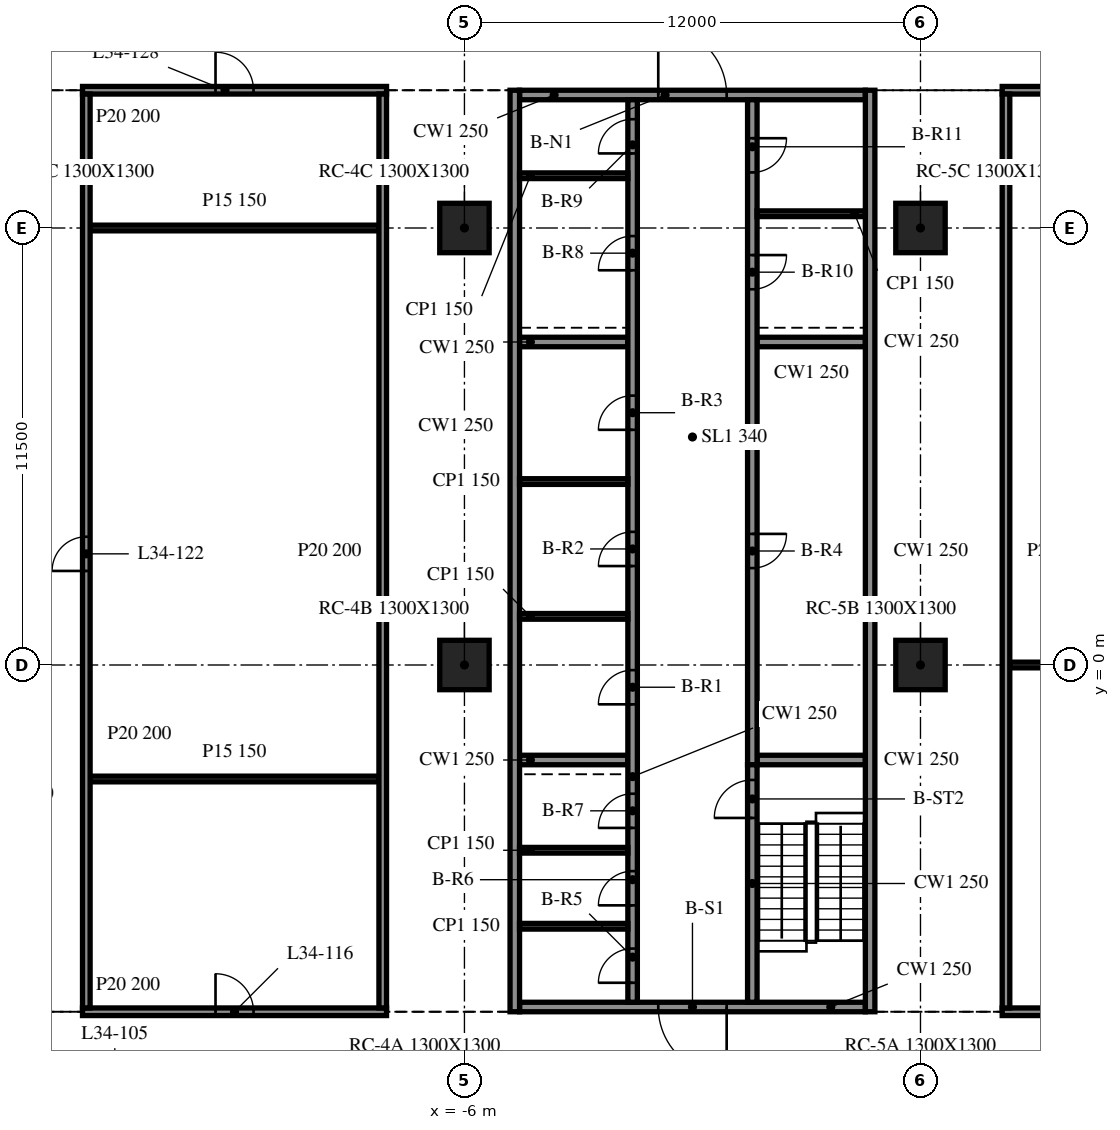
"""IFC4 building model, lengths in metres.
Left out: names, types, materials, properties, quantities, classifications, styles, units other than length and angle.
Written with IfcOpenShell. Run it as: python <this file> out.ifc"""

import sys

from ifc_helpers import new_model, si_unit, direction, frame, frame_2d, origin, origin_2d, place, context, subcontext, project, spatial, rectangle, extrude, element, fill, save


model = new_model("IFC4")
c1 = context("Model", 3, precision=1e-05, world=origin(), true_north=direction((0.0, 1.0)))
c2 = subcontext(c1, "Body", "Model", "MODEL_VIEW")
j1 = project(units=[si_unit("LENGTHUNIT", "METRE"), si_unit("PLANEANGLEUNIT", "RADIAN")], contexts=[c1])
p1 = place(None, origin())
s1 = spatial("IfcSite", under=j1, at=p1, CompositionType="ELEMENT")
p2 = place(p1, origin())
s2 = spatial("IfcBuilding", under=s1, at=p2, CompositionType="ELEMENT")
p3 = place(p2, frame((0.0, 0.0, 146.6)))
s3 = spatial("IfcBuildingStorey", under=s2, at=p3, CompositionType="ELEMENT", Elevation=146.6)
for number, where, z_axis, x_axis in (
    (1, (-6.0, 0.0, -0.34), (0.0, 0.0, 1.0), (1.0, 0.0, 0.0)),
    (2, (-6.0, 11.5, -0.34), (0.0, 0.0, 1.0), (1.0, 0.0, 0.0)),
    (3, (6.0, 0.0, -0.34), (0.0, 0.0, 1.0), (1.0, 0.0, 0.0)),
    (4, (6.0, 11.5, -0.34), (0.0, 0.0, 1.0), (1.0, 0.0, 0.0)),
):
    element("IfcColumn", number, at=place(p3, frame(where, z_axis=z_axis, x_axis=x_axis)), inside=s3, PredefinedType="COLUMN", context=c2, shape_type="SweptSolid", body=[
        extrude(rectangle(XDim=1.3, YDim=1.3, at=origin_2d()), origin(), (0.0, 0.0, 1.0), 4.1),
    ])
for number, where, z_axis, x_axis in (
    (5, (-4.675, 15.125, 0.0), (0.0, 0.0, 1.0), (0.0, -1.0, 0.0)),
    (6, (4.675, -9.125, 0.0), (0.0, 0.0, 1.0), (0.0, 1.0, 0.0)),
):
    element("IfcWall", number, at=place(p3, frame(where, z_axis=z_axis, x_axis=x_axis)), inside=s3, PredefinedType="SOLIDWALL", context=c2, shape_type="SweptSolid", body=[
        extrude(rectangle(XDim=24.25, YDim=0.25, at=frame_2d((12.125, 0.0))), origin(), (0.0, 0.0, 1.0), 3.76),
    ])
p4 = place(p3, frame((4.55, -9.0, 0.0), z_axis=(0.0, 0.0, 1.0), x_axis=(-1.0, 0.0, 0.0)))
e7 = element("IfcWall", 7, at=p4, inside=s3, PredefinedType="SOLIDWALL", context=c2, shape_type="SweptSolid", body=[
    extrude(rectangle(XDim=9.1, YDim=0.25, at=frame_2d((4.55, 0.0))), origin(), (0.0, 0.0, 1.0), 3.76),
])
p5 = place(p4, frame((3.65, 0.0, 0.0)))
e8 = element("IfcOpeningElement", 8, at=p5, cuts=e7, PredefinedType="OPENING", context=c2, shape_type="SweptSolid", body=[
    extrude(rectangle(XDim=1.8, YDim=2.1, at=frame_2d((0.9, 1.05))), frame((0.0, 0.135, 0.0), z_axis=(0.0, -1.0, 0.0), x_axis=(1.0, 0.0, 0.0)), (0.0, 0.0, 1.0), 0.27),
])
p6 = place(p3, frame((-4.55, 15.0, 0.0), z_axis=(0.0, 0.0, 1.0), x_axis=(1.0, 0.0, 0.0)))
e9 = element("IfcWall", 9, at=p6, inside=s3, PredefinedType="SOLIDWALL", context=c2, shape_type="SweptSolid", body=[
    extrude(rectangle(XDim=9.1, YDim=0.25, at=frame_2d((4.55, 0.0))), origin(), (0.0, 0.0, 1.0), 3.76),
])
p7 = place(p6, frame((3.65, 0.0, 0.0)))
e10 = element("IfcOpeningElement", 10, at=p7, cuts=e9, PredefinedType="OPENING", context=c2, shape_type="SweptSolid", body=[
    extrude(rectangle(XDim=1.8, YDim=2.1, at=frame_2d((0.9, 1.05))), frame((0.0, 0.135, 0.0), z_axis=(0.0, -1.0, 0.0), x_axis=(1.0, 0.0, 0.0)), (0.0, 0.0, 1.0), 0.27),
])
p8 = place(p3, frame((-1.575, -8.875, 0.0), z_axis=(0.0, 0.0, 1.0), x_axis=(0.0, 1.0, 0.0)))
e11 = element("IfcWall", 11, at=p8, inside=s3, PredefinedType="SOLIDWALL", context=c2, shape_type="SweptSolid", body=[
    extrude(rectangle(XDim=23.75, YDim=0.25, at=frame_2d((11.875, 0.0))), origin(), (0.0, 0.0, 1.0), 3.76),
])
p9 = place(p8, frame((7.84, 0.0, 0.0)))
e12 = element("IfcOpeningElement", 12, at=p9, cuts=e11, PredefinedType="OPENING", context=c2, shape_type="SweptSolid", body=[
    extrude(rectangle(XDim=0.9, YDim=2.1, at=frame_2d((0.45, 1.05))), frame((0.0, 0.135, 0.0), z_axis=(0.0, -1.0, 0.0), x_axis=(1.0, 0.0, 0.0)), (0.0, 0.0, 1.0), 0.27),
])
p10 = place(p8, frame((11.479, 0.0, 0.0)))
e13 = element("IfcOpeningElement", 13, at=p10, cuts=e11, PredefinedType="OPENING", context=c2, shape_type="SweptSolid", body=[
    extrude(rectangle(XDim=0.9, YDim=2.1, at=frame_2d((0.45, 1.05))), frame((0.0, 0.135, 0.0), z_axis=(0.0, -1.0, 0.0), x_axis=(1.0, 0.0, 0.0)), (0.0, 0.0, 1.0), 0.27),
])
p11 = place(p8, frame((15.064, 0.0, 0.0)))
e14 = element("IfcOpeningElement", 14, at=p11, cuts=e11, PredefinedType="OPENING", context=c2, shape_type="SweptSolid", body=[
    extrude(rectangle(XDim=0.9, YDim=2.1, at=frame_2d((0.45, 1.05))), frame((0.0, 0.135, 0.0), z_axis=(0.0, -1.0, 0.0), x_axis=(1.0, 0.0, 0.0)), (0.0, 0.0, 1.0), 0.27),
])
p12 = place(p8, frame((0.512, 0.0, 0.0)))
e15 = element("IfcOpeningElement", 15, at=p12, cuts=e11, PredefinedType="OPENING", context=c2, shape_type="SweptSolid", body=[
    extrude(rectangle(XDim=0.9, YDim=2.1, at=frame_2d((0.45, 1.05))), frame((0.0, 0.135, 0.0), z_axis=(0.0, -1.0, 0.0), x_axis=(1.0, 0.0, 0.0)), (0.0, 0.0, 1.0), 0.27),
])
p13 = place(p8, frame((2.55, 0.0, 0.0)))
e16 = element("IfcOpeningElement", 16, at=p13, cuts=e11, PredefinedType="OPENING", context=c2, shape_type="SweptSolid", body=[
    extrude(rectangle(XDim=0.9, YDim=2.1, at=frame_2d((0.45, 1.05))), frame((0.0, 0.135, 0.0), z_axis=(0.0, -1.0, 0.0), x_axis=(1.0, 0.0, 0.0)), (0.0, 0.0, 1.0), 0.27),
])
p14 = place(p8, frame((4.587, 0.0, 0.0)))
e17 = element("IfcOpeningElement", 17, at=p14, cuts=e11, PredefinedType="OPENING", context=c2, shape_type="SweptSolid", body=[
    extrude(rectangle(XDim=0.9, YDim=2.1, at=frame_2d((0.45, 1.05))), frame((0.0, 0.135, 0.0), z_axis=(0.0, -1.0, 0.0), x_axis=(1.0, 0.0, 0.0)), (0.0, 0.0, 1.0), 0.27),
])
p15 = place(p8, frame((19.262, 0.0, 0.0)))
e18 = element("IfcOpeningElement", 18, at=p15, cuts=e11, PredefinedType="OPENING", context=c2, shape_type="SweptSolid", body=[
    extrude(rectangle(XDim=0.9, YDim=2.1, at=frame_2d((0.45, 1.05))), frame((0.0, 0.135, 0.0), z_axis=(0.0, -1.0, 0.0), x_axis=(1.0, 0.0, 0.0)), (0.0, 0.0, 1.0), 0.27),
])
p16 = place(p8, frame((22.337, 0.0, 0.0)))
e19 = element("IfcOpeningElement", 19, at=p16, cuts=e11, PredefinedType="OPENING", context=c2, shape_type="SweptSolid", body=[
    extrude(rectangle(XDim=0.9, YDim=2.1, at=frame_2d((0.45, 1.05))), frame((0.0, 0.135, 0.0), z_axis=(0.0, -1.0, 0.0), x_axis=(1.0, 0.0, 0.0)), (0.0, 0.0, 1.0), 0.27),
])
p17 = place(p3, frame((1.575, -8.875, 0.0), z_axis=(0.0, 0.0, 1.0), x_axis=(0.0, 1.0, 0.0)))
e20 = element("IfcWall", 20, at=p17, inside=s3, PredefinedType="SOLIDWALL", context=c2, shape_type="SweptSolid", body=[
    extrude(rectangle(XDim=6.25, YDim=0.25, at=frame_2d((3.125, 0.0))), origin(), (0.0, 0.0, 1.0), 3.76),
])
p18 = place(p17, frame((4.85, 0.0, 0.0)))
e21 = element("IfcOpeningElement", 21, at=p18, cuts=e20, PredefinedType="OPENING", context=c2, shape_type="SweptSolid", body=[
    extrude(rectangle(XDim=1.0, YDim=2.1, at=frame_2d((0.5, 1.05))), frame((0.0, 0.135, 0.0), z_axis=(0.0, -1.0, 0.0), x_axis=(1.0, 0.0, 0.0)), (0.0, 0.0, 1.0), 0.27),
])
p19 = place(p3, frame((1.575, 14.875, 0.0), z_axis=(0.0, 0.0, 1.0), x_axis=(0.0, -1.0, 0.0)))
e22 = element("IfcWall", 22, at=p19, inside=s3, PredefinedType="SOLIDWALL", context=c2, shape_type="SweptSolid", body=[
    extrude(rectangle(XDim=17.5, YDim=0.25, at=frame_2d((8.75, 0.0))), origin(), (0.0, 0.0, 1.0), 3.76),
])
p20 = place(p19, frame((11.425, 0.0, 0.0)))
e23 = element("IfcOpeningElement", 23, at=p20, cuts=e22, PredefinedType="OPENING", context=c2, shape_type="SweptSolid", body=[
    extrude(rectangle(XDim=0.9, YDim=2.1, at=frame_2d((0.45, 1.05))), frame((0.0, 0.135, 0.0), z_axis=(0.0, -1.0, 0.0), x_axis=(1.0, 0.0, 0.0)), (0.0, 0.0, 1.0), 0.27),
])
p21 = place(p19, frame((4.087, 0.0, 0.0)))
e24 = element("IfcOpeningElement", 24, at=p21, cuts=e22, PredefinedType="OPENING", context=c2, shape_type="SweptSolid", body=[
    extrude(rectangle(XDim=0.9, YDim=2.1, at=frame_2d((0.45, 1.05))), frame((0.0, 0.135, 0.0), z_axis=(0.0, -1.0, 0.0), x_axis=(1.0, 0.0, 0.0)), (0.0, 0.0, 1.0), 0.27),
])
p22 = place(p19, frame((1.012, 0.0, 0.0)))
e25 = element("IfcOpeningElement", 25, at=p22, cuts=e22, PredefinedType="OPENING", context=c2, shape_type="SweptSolid", body=[
    extrude(rectangle(XDim=0.9, YDim=2.1, at=frame_2d((0.45, 1.05))), frame((0.0, 0.135, 0.0), z_axis=(0.0, -1.0, 0.0), x_axis=(1.0, 0.0, 0.0)), (0.0, 0.0, 1.0), 0.27),
])
for number, where, z_axis, x_axis in (
    (26, (-4.55, -2.5, 0.0), (0.0, 0.0, 1.0), (1.0, 0.0, 0.0)),
    (27, (-4.55, 8.5, 0.0), (0.0, 0.0, 1.0), (1.0, 0.0, 0.0)),
    (28, (1.7, -2.5, 0.0), (0.0, 0.0, 1.0), (1.0, 0.0, 0.0)),
    (29, (1.7, 8.5, 0.0), (0.0, 0.0, 1.0), (1.0, 0.0, 0.0)),
):
    element("IfcWall", number, at=place(p3, frame(where, z_axis=z_axis, x_axis=x_axis)), inside=s3, PredefinedType="SOLIDWALL", context=c2, shape_type="SweptSolid", body=[
        extrude(rectangle(XDim=2.85, YDim=0.25, at=frame_2d((1.425, 0.0))), origin(), (0.0, 0.0, 1.0), 3.76),
    ])
for number, where, z_axis, x_axis in (
    (30, (-4.55, 1.28, 0.0), (0.0, 0.0, 1.0), (1.0, 0.0, 0.0)),
    (31, (-4.55, 4.827, 0.0), (0.0, 0.0, 1.0), (1.0, 0.0, 0.0)),
    (32, (-4.55, -6.875, 0.0), (0.0, 0.0, 1.0), (1.0, 0.0, 0.0)),
    (33, (-4.55, -4.875, 0.0), (0.0, 0.0, 1.0), (1.0, 0.0, 0.0)),
    (34, (-4.55, 12.875, 0.0), (0.0, 0.0, 1.0), (1.0, 0.0, 0.0)),
    (35, (1.7, 11.875, 0.0), (0.0, 0.0, 1.0), (1.0, 0.0, 0.0)),
):
    element("IfcWall", number, at=place(p3, frame(where, z_axis=z_axis, x_axis=x_axis)), inside=s3, PredefinedType="PARTITIONING", context=c2, shape_type="SweptSolid", body=[
        extrude(rectangle(XDim=2.85, YDim=0.15, at=frame_2d((1.425, 0.0))), origin(), (0.0, 0.0, 1.0), 3.76),
    ])
p23 = place(p3, frame((-16.05, -9.125, 0.0), z_axis=(0.0, 0.0, 1.0), x_axis=(1.0, 0.0, 0.0)))
e36 = element("IfcWall", 36, at=p23, inside=s3, PredefinedType="PARTITIONING", context=c2, shape_type="SweptSolid", body=[
    extrude(rectangle(XDim=8.0, YDim=0.2, at=frame_2d((4.0, 0.0))), origin(), (0.0, 0.0, 1.0), 3.76),
])
p24 = place(p23, frame((3.5, 0.0, 0.0)))
e37 = element("IfcOpeningElement", 37, at=p24, cuts=e36, PredefinedType="OPENING", context=c2, shape_type="SweptSolid", body=[
    extrude(rectangle(XDim=1.0, YDim=2.1, at=frame_2d((0.5, 1.05))), frame((0.0, 0.11, 0.0), z_axis=(0.0, -1.0, 0.0), x_axis=(1.0, 0.0, 0.0)), (0.0, 0.0, 1.0), 0.22),
])
p25 = place(p3, frame((8.15, -9.125, 0.0), z_axis=(0.0, 0.0, 1.0), x_axis=(1.0, 0.0, 0.0)))
e38 = element("IfcWall", 38, at=p25, inside=s3, PredefinedType="PARTITIONING", context=c2, shape_type="SweptSolid", body=[
    extrude(rectangle(XDim=7.6, YDim=0.2, at=frame_2d((3.8, 0.0))), origin(), (0.0, 0.0, 1.0), 3.76),
])
p26 = place(p25, frame((3.3, 0.0, 0.0)))
e39 = element("IfcOpeningElement", 39, at=p26, cuts=e38, PredefinedType="OPENING", context=c2, shape_type="SweptSolid", body=[
    extrude(rectangle(XDim=1.0, YDim=2.1, at=frame_2d((0.5, 1.05))), frame((0.0, 0.11, 0.0), z_axis=(0.0, -1.0, 0.0), x_axis=(1.0, 0.0, 0.0)), (0.0, 0.0, 1.0), 0.22),
])
p27 = place(p3, frame((-15.85, -3.0, 0.0), z_axis=(0.0, 0.0, 1.0), x_axis=(1.0, 0.0, 0.0)))
e40 = element("IfcWall", 40, at=p27, inside=s3, PredefinedType="PARTITIONING", context=c2, shape_type="SweptSolid", body=[
    extrude(rectangle(XDim=7.6, YDim=0.15, at=frame_2d((3.8, 0.0))), origin(), (0.0, 0.0, 1.0), 3.76),
])
p28 = place(p3, frame((8.35, 0.0, 0.0), z_axis=(0.0, 0.0, 1.0), x_axis=(1.0, 0.0, 0.0)))
e41 = element("IfcWall", 41, at=p28, inside=s3, PredefinedType="PARTITIONING", context=c2, shape_type="SweptSolid", body=[
    extrude(rectangle(XDim=7.2, YDim=0.15, at=frame_2d((3.6, 0.0))), origin(), (0.0, 0.0, 1.0), 3.76),
])
p29 = place(p3, frame((-15.85, 11.5, 0.0), z_axis=(0.0, 0.0, 1.0), x_axis=(1.0, 0.0, 0.0)))
e42 = element("IfcWall", 42, at=p29, inside=s3, PredefinedType="PARTITIONING", context=c2, shape_type="SweptSolid", body=[
    extrude(rectangle(XDim=7.6, YDim=0.15, at=frame_2d((3.8, 0.0))), origin(), (0.0, 0.0, 1.0), 3.76),
])
p30 = place(p3, frame((-16.05, 15.125, 0.0), z_axis=(0.0, 0.0, 1.0), x_axis=(1.0, 0.0, 0.0)))
e43 = element("IfcWall", 43, at=p30, inside=s3, PredefinedType="PARTITIONING", context=c2, shape_type="SweptSolid", body=[
    extrude(rectangle(XDim=8.0, YDim=0.2, at=frame_2d((4.0, 0.0))), origin(), (0.0, 0.0, 1.0), 3.76),
])
p31 = place(p30, frame((3.5, 0.0, 0.0)))
e44 = element("IfcOpeningElement", 44, at=p31, cuts=e43, PredefinedType="OPENING", context=c2, shape_type="SweptSolid", body=[
    extrude(rectangle(XDim=1.0, YDim=2.1, at=frame_2d((0.5, 1.05))), frame((0.0, 0.11, 0.0), z_axis=(0.0, -1.0, 0.0), x_axis=(1.0, 0.0, 0.0)), (0.0, 0.0, 1.0), 0.22),
])
p32 = place(p3, frame((8.15, 15.125, 0.0), z_axis=(0.0, 0.0, 1.0), x_axis=(1.0, 0.0, 0.0)))
e45 = element("IfcWall", 45, at=p32, inside=s3, PredefinedType="PARTITIONING", context=c2, shape_type="SweptSolid", body=[
    extrude(rectangle(XDim=7.6, YDim=0.2, at=frame_2d((3.8, 0.0))), origin(), (0.0, 0.0, 1.0), 3.76),
])
p33 = place(p32, frame((3.3, 0.0, 0.0)))
e46 = element("IfcOpeningElement", 46, at=p33, cuts=e45, PredefinedType="OPENING", context=c2, shape_type="SweptSolid", body=[
    extrude(rectangle(XDim=0.9, YDim=2.1, at=frame_2d((0.45, 1.05))), frame((0.0, 0.11, 0.0), z_axis=(0.0, -1.0, 0.0), x_axis=(1.0, 0.0, 0.0)), (0.0, 0.0, 1.0), 0.22),
])
p34 = place(p3, frame((-15.95, -9.025, 0.0), z_axis=(0.0, 0.0, 1.0), x_axis=(0.0, 1.0, 0.0)))
e47 = element("IfcWall", 47, at=p34, inside=s3, PredefinedType="PARTITIONING", context=c2, shape_type="SweptSolid", body=[
    extrude(rectangle(XDim=24.05, YDim=0.2, at=frame_2d((12.025, 0.0))), origin(), (0.0, 0.0, 1.0), 3.76),
])
p35 = place(p34, frame((11.5, 0.0, 0.0)))
e48 = element("IfcOpeningElement", 48, at=p35, cuts=e47, PredefinedType="OPENING", context=c2, shape_type="SweptSolid", body=[
    extrude(rectangle(XDim=0.9, YDim=2.1, at=frame_2d((0.45, 1.05))), frame((0.0, 0.11, 0.0), z_axis=(0.0, -1.0, 0.0), x_axis=(1.0, 0.0, 0.0)), (0.0, 0.0, 1.0), 0.22),
])
for number, where, z_axis, x_axis in (
    (49, (-8.15, -9.025, 0.0), (0.0, 0.0, 1.0), (0.0, 1.0, 0.0)),
    (50, (8.25, -9.025, 0.0), (0.0, 0.0, 1.0), (0.0, 1.0, 0.0)),
):
    element("IfcWall", number, at=place(p3, frame(where, z_axis=z_axis, x_axis=x_axis)), inside=s3, PredefinedType="PARTITIONING", context=c2, shape_type="SweptSolid", body=[
        extrude(rectangle(XDim=24.05, YDim=0.2, at=frame_2d((12.025, 0.0))), origin(), (0.0, 0.0, 1.0), 3.76),
    ])
p36 = place(p5, origin())
e51 = element("IfcDoor", 51, at=p36, inside=s3, OperationType="DOUBLE_DOOR_SINGLE_SWING", PredefinedType="DOOR", context=c2, shape_type="SweptSolid", body=[
    extrude(rectangle(XDim=1.8, YDim=2.1, at=frame_2d((0.9, 1.05))), frame((0.0, 0.025, 0.0), z_axis=(0.0, -1.0, 0.0), x_axis=(1.0, 0.0, 0.0)), (0.0, 0.0, 1.0), 0.05),
])
fill(e8, e51)
p37 = place(p7, origin())
e52 = element("IfcDoor", 52, at=p37, inside=s3, OperationType="DOUBLE_DOOR_SINGLE_SWING", PredefinedType="DOOR", context=c2, shape_type="SweptSolid", body=[
    extrude(rectangle(XDim=1.8, YDim=2.1, at=frame_2d((0.9, 1.05))), frame((0.0, 0.025, 0.0), z_axis=(0.0, -1.0, 0.0), x_axis=(1.0, 0.0, 0.0)), (0.0, 0.0, 1.0), 0.05),
])
fill(e10, e52)
p38 = place(p9, origin())
e53 = element("IfcDoor", 53, at=p38, inside=s3, OperationType="SINGLE_SWING_LEFT", PredefinedType="DOOR", context=c2, shape_type="SweptSolid", body=[
    extrude(rectangle(XDim=0.9, YDim=2.1, at=frame_2d((0.45, 1.05))), frame((0.0, 0.025, 0.0), z_axis=(0.0, -1.0, 0.0), x_axis=(1.0, 0.0, 0.0)), (0.0, 0.0, 1.0), 0.05),
])
fill(e12, e53)
p39 = place(p10, origin())
e54 = element("IfcDoor", 54, at=p39, inside=s3, OperationType="SINGLE_SWING_RIGHT", PredefinedType="DOOR", context=c2, shape_type="SweptSolid", body=[
    extrude(rectangle(XDim=0.9, YDim=2.1, at=frame_2d((0.45, 1.05))), frame((0.0, 0.025, 0.0), z_axis=(0.0, -1.0, 0.0), x_axis=(1.0, 0.0, 0.0)), (0.0, 0.0, 1.0), 0.05),
])
fill(e13, e54)
p40 = place(p11, origin())
e55 = element("IfcDoor", 55, at=p40, inside=s3, OperationType="SINGLE_SWING_LEFT", PredefinedType="DOOR", context=c2, shape_type="SweptSolid", body=[
    extrude(rectangle(XDim=0.9, YDim=2.1, at=frame_2d((0.45, 1.05))), frame((0.0, 0.025, 0.0), z_axis=(0.0, -1.0, 0.0), x_axis=(1.0, 0.0, 0.0)), (0.0, 0.0, 1.0), 0.05),
])
fill(e14, e55)
p41 = place(p20, origin())
e56 = element("IfcDoor", 56, at=p41, inside=s3, OperationType="SINGLE_SWING_RIGHT", PredefinedType="DOOR", context=c2, shape_type="SweptSolid", body=[
    extrude(rectangle(XDim=0.9, YDim=2.1, at=frame_2d((0.45, 1.05))), frame((0.0, 0.025, 0.0), z_axis=(0.0, -1.0, 0.0), x_axis=(1.0, 0.0, 0.0)), (0.0, 0.0, 1.0), 0.05),
])
fill(e23, e56)
p42 = place(p12, origin())
e57 = element("IfcDoor", 57, at=p42, inside=s3, OperationType="SINGLE_SWING_LEFT", PredefinedType="DOOR", context=c2, shape_type="SweptSolid", body=[
    extrude(rectangle(XDim=0.9, YDim=2.1, at=frame_2d((0.45, 1.05))), frame((0.0, 0.025, 0.0), z_axis=(0.0, -1.0, 0.0), x_axis=(1.0, 0.0, 0.0)), (0.0, 0.0, 1.0), 0.05),
])
fill(e15, e57)
p43 = place(p13, origin())
e58 = element("IfcDoor", 58, at=p43, inside=s3, OperationType="SINGLE_SWING_RIGHT", PredefinedType="DOOR", context=c2, shape_type="SweptSolid", body=[
    extrude(rectangle(XDim=0.9, YDim=2.1, at=frame_2d((0.45, 1.05))), frame((0.0, 0.025, 0.0), z_axis=(0.0, -1.0, 0.0), x_axis=(1.0, 0.0, 0.0)), (0.0, 0.0, 1.0), 0.05),
])
fill(e16, e58)
p44 = place(p14, origin())
e59 = element("IfcDoor", 59, at=p44, inside=s3, OperationType="SINGLE_SWING_LEFT", PredefinedType="DOOR", context=c2, shape_type="SweptSolid", body=[
    extrude(rectangle(XDim=0.9, YDim=2.1, at=frame_2d((0.45, 1.05))), frame((0.0, 0.025, 0.0), z_axis=(0.0, -1.0, 0.0), x_axis=(1.0, 0.0, 0.0)), (0.0, 0.0, 1.0), 0.05),
])
fill(e17, e59)
p45 = place(p15, origin())
e60 = element("IfcDoor", 60, at=p45, inside=s3, OperationType="SINGLE_SWING_RIGHT", PredefinedType="DOOR", context=c2, shape_type="SweptSolid", body=[
    extrude(rectangle(XDim=0.9, YDim=2.1, at=frame_2d((0.45, 1.05))), frame((0.0, 0.025, 0.0), z_axis=(0.0, -1.0, 0.0), x_axis=(1.0, 0.0, 0.0)), (0.0, 0.0, 1.0), 0.05),
])
fill(e18, e60)
p46 = place(p16, origin())
e61 = element("IfcDoor", 61, at=p46, inside=s3, OperationType="SINGLE_SWING_LEFT", PredefinedType="DOOR", context=c2, shape_type="SweptSolid", body=[
    extrude(rectangle(XDim=0.9, YDim=2.1, at=frame_2d((0.45, 1.05))), frame((0.0, 0.025, 0.0), z_axis=(0.0, -1.0, 0.0), x_axis=(1.0, 0.0, 0.0)), (0.0, 0.0, 1.0), 0.05),
])
fill(e19, e61)
p47 = place(p21, origin())
e62 = element("IfcDoor", 62, at=p47, inside=s3, OperationType="SINGLE_SWING_RIGHT", PredefinedType="DOOR", context=c2, shape_type="SweptSolid", body=[
    extrude(rectangle(XDim=0.9, YDim=2.1, at=frame_2d((0.45, 1.05))), frame((0.0, 0.025, 0.0), z_axis=(0.0, -1.0, 0.0), x_axis=(1.0, 0.0, 0.0)), (0.0, 0.0, 1.0), 0.05),
])
fill(e24, e62)
p48 = place(p22, origin())
e63 = element("IfcDoor", 63, at=p48, inside=s3, OperationType="SINGLE_SWING_LEFT", PredefinedType="DOOR", context=c2, shape_type="SweptSolid", body=[
    extrude(rectangle(XDim=0.9, YDim=2.1, at=frame_2d((0.45, 1.05))), frame((0.0, 0.025, 0.0), z_axis=(0.0, -1.0, 0.0), x_axis=(1.0, 0.0, 0.0)), (0.0, 0.0, 1.0), 0.05),
])
fill(e25, e63)
p49 = place(p18, origin())
e64 = element("IfcDoor", 64, at=p49, inside=s3, OperationType="SINGLE_SWING_RIGHT", PredefinedType="DOOR", context=c2, shape_type="SweptSolid", body=[
    extrude(rectangle(XDim=1.0, YDim=2.1, at=frame_2d((0.5, 1.05))), frame((0.0, 0.025, 0.0), z_axis=(0.0, -1.0, 0.0), x_axis=(1.0, 0.0, 0.0)), (0.0, 0.0, 1.0), 0.05),
])
fill(e21, e64)
p50 = place(p24, origin())
e65 = element("IfcDoor", 65, at=p50, inside=s3, OperationType="SINGLE_SWING_LEFT", PredefinedType="DOOR", context=c2, shape_type="SweptSolid", body=[
    extrude(rectangle(XDim=1.0, YDim=2.1, at=frame_2d((0.5, 1.05))), frame((0.0, 0.025, 0.0), z_axis=(0.0, -1.0, 0.0), x_axis=(1.0, 0.0, 0.0)), (0.0, 0.0, 1.0), 0.05),
])
fill(e37, e65)
p51 = place(p35, origin())
e66 = element("IfcDoor", 66, at=p51, inside=s3, OperationType="SINGLE_SWING_RIGHT", PredefinedType="DOOR", context=c2, shape_type="SweptSolid", body=[
    extrude(rectangle(XDim=0.9, YDim=2.1, at=frame_2d((0.45, 1.05))), frame((0.0, 0.025, 0.0), z_axis=(0.0, -1.0, 0.0), x_axis=(1.0, 0.0, 0.0)), (0.0, 0.0, 1.0), 0.05),
])
fill(e48, e66)
p52 = place(p31, origin())
e67 = element("IfcDoor", 67, at=p52, inside=s3, OperationType="SINGLE_SWING_RIGHT", PredefinedType="DOOR", context=c2, shape_type="SweptSolid", body=[
    extrude(rectangle(XDim=1.0, YDim=2.1, at=frame_2d((0.5, 1.05))), frame((0.0, 0.025, 0.0), z_axis=(0.0, -1.0, 0.0), x_axis=(1.0, 0.0, 0.0)), (0.0, 0.0, 1.0), 0.05),
])
fill(e44, e67)
save(model, sys.argv[1])
